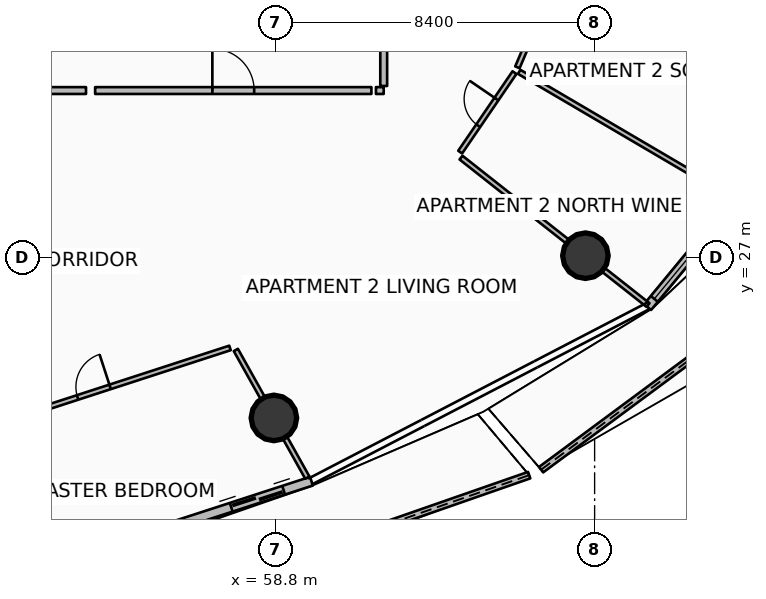
"""IFC4 building model, lengths in metres.
Left out: names, types, materials, properties, quantities, classifications, styles, units other than length and angle.
Written with IfcOpenShell. Run it as: python <this file> out.ifc"""

import sys

from ifc_helpers import new_model, si_unit, direction, frame, frame_2d, origin, origin_2d, place, context, subcontext, project, spatial, polyline, rectangle, circle, outline, extrude, element, fill, save


model = new_model("IFC4")
c1 = context("Model", 3, precision=1e-05, world=origin(), true_north=direction((0.0, 1.0)))
c2 = subcontext(c1, "Body", "Model", "MODEL_VIEW")
j1 = project(units=[si_unit("LENGTHUNIT", "METRE"), si_unit("PLANEANGLEUNIT", "RADIAN")], contexts=[c1])
p1 = place(None, origin())
s1 = spatial("IfcSite", under=j1, at=p1, CompositionType="ELEMENT")
p2 = place(p1, origin())
s2 = spatial("IfcBuilding", under=s1, at=p2, CompositionType="ELEMENT")
p3 = place(p2, frame((0.0, 0.0, 90.15)))
s3 = spatial("IfcBuildingStorey", under=s2, at=p3, CompositionType="ELEMENT", Elevation=90.15)
for number, where, z_axis, x_axis in (
    (1, (58.76, 22.786, 0.0), (0.0, 0.0, 1.0), (1.0, 0.0, 0.0)),
    (2, (66.958, 27.055, 0.0), (0.0, 0.0, 1.0), (1.0, 0.0, 0.0)),
):
    element("IfcColumn", number, at=place(p3, frame(where, z_axis=z_axis, x_axis=x_axis)), inside=s3, PredefinedType="COLUMN", context=c2, shape_type="SweptSolid", body=[
        extrude(circle(Radius=0.6, at=origin_2d()), origin(), (0.0, 0.0, 1.0), 3.5),
    ])
p4 = place(p3, frame((55.938, 17.957, 0.0), z_axis=(0.0, 0.0, 1.0), x_axis=(0.944336605893, 0.328980812161, 0.0)))
e3 = element("IfcWall", 3, at=p4, inside=s3, PredefinedType="PARAPET", context=c2, shape_type="SweptSolid", body=[
    extrude(outline(polyline([(0.0, 0.0), (10.102, 0.0), (10.102, 1.483), (5.051, 1.284), (0.0, 1.148), (0.0, 0.0)])), frame((0.0, 0.09, 0.0), z_axis=(0.0, -1.0, 0.0), x_axis=(1.0, 0.0, 0.0)), (0.0, 0.0, 1.0), 0.18),
])
p5 = place(p3, frame((65.792, 21.424, 0.0), z_axis=(0.0, 0.0, 1.0), x_axis=(0.803659411402, 0.59508953147, 0.0)))
e4 = element("IfcWall", 4, at=p5, inside=s3, PredefinedType="PARAPET", context=c2, shape_type="SweptSolid", body=[
    extrude(outline(polyline([(0.0, 0.0), (11.338, 0.0), (11.338, 1.832), (5.669, 1.696), (0.0, 1.497), (0.0, 0.0)])), frame((0.0, 0.09, 0.0), z_axis=(0.0, -1.0, 0.0), x_axis=(1.0, 0.0, 0.0)), (0.0, 0.0, 1.0), 0.18),
])
p6 = place(p3, frame((50.767, 18.203, 0.0), z_axis=(0.0, 0.0, 1.0), x_axis=(0.951052494852, 0.30902937083, 0.0)))
e5 = element("IfcWall", 5, at=p6, inside=s3, PredefinedType="SOLIDWALL", context=c2, shape_type="SweptSolid", body=[
    extrude(rectangle(XDim=9.444, YDim=0.24, at=frame_2d((4.722, 0.0))), origin(), (0.0, 0.0, 1.0), 2.45),
])
p7 = place(p6, frame((7.224, 0.0, 0.0)))
e6 = element("IfcOpeningElement", 6, at=p7, cuts=e5, PredefinedType="OPENING", context=c2, shape_type="SweptSolid", body=[
    extrude(rectangle(XDim=1.45, YDim=2.15, at=frame_2d((0.725, 1.075))), frame((0.0, 0.13, 0.0), z_axis=(0.0, -1.0, 0.0), x_axis=(1.0, 0.0, 0.0)), (0.0, 0.0, 1.0), 0.26),
])
p8 = place(p6, frame((0.28, 0.0, 0.65)))
e7 = element("IfcOpeningElement", 7, at=p8, cuts=e5, PredefinedType="OPENING", context=c2, shape_type="SweptSolid", body=[
    extrude(rectangle(XDim=1.6, YDim=1.5, at=frame_2d((0.8, 0.75))), frame((0.0, 0.13, 0.0), z_axis=(0.0, -1.0, 0.0), x_axis=(1.0, 0.0, 0.0)), (0.0, 0.0, 1.0), 0.26),
])
p9 = place(p3, frame((68.593, 25.702, 0.0), z_axis=(0.0, 0.0, 1.0), x_axis=(0.636704975, 0.771107498868, 0.0)))
e8 = element("IfcWall", 8, at=p9, inside=s3, PredefinedType="SOLIDWALL", context=c2, shape_type="SweptSolid", body=[
    extrude(rectangle(XDim=11.084, YDim=0.24, at=frame_2d((5.542, 0.0))), origin(), (0.0, 0.0, 1.0), 2.45),
])
p10 = place(p9, frame((8.864, 0.0, 0.0)))
e9 = element("IfcOpeningElement", 9, at=p10, cuts=e8, PredefinedType="OPENING", context=c2, shape_type="SweptSolid", body=[
    extrude(rectangle(XDim=1.45, YDim=2.15, at=frame_2d((0.725, 1.075))), frame((0.0, 0.13, 0.0), z_axis=(0.0, -1.0, 0.0), x_axis=(1.0, 0.0, 0.0)), (0.0, 0.0, 1.0), 0.26),
])
p11 = place(p9, frame((0.28, 0.0, 0.65)))
e10 = element("IfcOpeningElement", 10, at=p11, cuts=e8, PredefinedType="OPENING", context=c2, shape_type="SweptSolid", body=[
    extrude(rectangle(XDim=1.6, YDim=1.5, at=frame_2d((0.8, 0.75))), frame((0.0, 0.13, 0.0), z_axis=(0.0, -1.0, 0.0), x_axis=(1.0, 0.0, 0.0)), (0.0, 0.0, 1.0), 0.26),
])
p12 = place(p3, frame((54.056, 31.4, 0.0), z_axis=(0.0, 0.0, 1.0), x_axis=(1.0, 0.0, 0.0)))
e11 = element("IfcWall", 11, at=p12, inside=s3, PredefinedType="PARTITIONING", context=c2, shape_type="SweptSolid", body=[
    extrude(rectangle(XDim=7.27, YDim=0.18, at=frame_2d((3.635, 0.0))), origin(), (0.0, 0.0, 1.0), 2.94),
])
p13 = place(p12, frame((3.085, 0.0, 0.0)))
e12 = element("IfcOpeningElement", 12, at=p13, cuts=e11, PredefinedType="OPENING", context=c2, shape_type="SweptSolid", body=[
    extrude(rectangle(XDim=1.1, YDim=2.1, at=frame_2d((0.55, 1.05))), frame((0.0, 0.1, 0.0), z_axis=(0.0, -1.0, 0.0), x_axis=(1.0, 0.0, 0.0)), (0.0, 0.0, 1.0), 0.2),
])
p14 = place(p3, frame((49.375, 31.4, 0.0), z_axis=(0.0, 0.0, 1.0), x_axis=(1.0, 0.0, 0.0)))
e13 = element("IfcWall", 13, at=p14, inside=s3, PredefinedType="PARTITIONING", context=c2, shape_type="SweptSolid", body=[
    extrude(rectangle(XDim=4.442, YDim=0.18, at=frame_2d((2.221, 0.0))), origin(), (0.0, 0.0, 1.0), 2.94),
])
p15 = place(p3, frame((57.759, 24.575, 0.0), z_axis=(0.0, 0.0, 1.0), x_axis=(0.488595646066, -0.87251034071, 0.0)))
e14 = element("IfcWall", 14, at=p15, inside=s3, PredefinedType="PARTITIONING", context=c2, shape_type="SweptSolid", body=[
    extrude(rectangle(XDim=3.851, YDim=0.125, at=frame_2d((1.925, 0.0))), origin(), (0.0, 0.0, 1.0), 2.94),
])
p16 = place(p3, frame((50.44, 22.3, 0.0), z_axis=(0.0, 0.0, 1.0), x_axis=(0.951063594717, 0.308995208383, 0.0)))
e15 = element("IfcWall", 15, at=p16, inside=s3, PredefinedType="PARTITIONING", context=c2, shape_type="SweptSolid", body=[
    extrude(rectangle(XDim=7.534, YDim=0.125, at=frame_2d((3.767, 0.0))), origin(), (0.0, 0.0, 1.0), 2.94),
])
p17 = place(p16, frame((3.317, 0.0, 0.0)))
e16 = element("IfcOpeningElement", 16, at=p17, cuts=e15, PredefinedType="OPENING", context=c2, shape_type="SweptSolid", body=[
    extrude(rectangle(XDim=0.9, YDim=2.08, at=frame_2d((0.45, 1.04))), frame((0.0, 0.073, 0.0), z_axis=(0.0, -1.0, 0.0), x_axis=(1.0, 0.0, 0.0)), (0.0, 0.0, 1.0), 0.145),
])
p18 = place(p3, frame((61.446, 31.4, 0.0), z_axis=(0.0, 0.0, 1.0), x_axis=(1.0, 0.0, 0.0)))
e17 = element("IfcWall", 17, at=p18, inside=s3, PredefinedType="PARTITIONING", context=c2, shape_type="SweptSolid", body=[
    extrude(rectangle(XDim=0.204, YDim=0.18, at=frame_2d((0.102, 0.0))), origin(), (0.0, 0.0, 1.0), 2.94),
])
p19 = place(p3, frame((61.65, 31.52, 0.0), z_axis=(0.0, 0.0, 1.0), x_axis=(0.0, 1.0, 0.0)))
e18 = element("IfcWall", 18, at=p19, inside=s3, PredefinedType="PARTITIONING", context=c2, shape_type="SweptSolid", body=[
    extrude(rectangle(XDim=6.51, YDim=0.18, at=frame_2d((3.255, 0.0))), origin(), (0.0, 0.0, 1.0), 2.94),
])
p20 = place(p3, frame((63.684, 29.635, 0.0), z_axis=(0.0, 0.0, 1.0), x_axis=(0.785296487737, -0.619119880434, 0.0)))
e19 = element("IfcWall", 19, at=p20, inside=s3, PredefinedType="PARTITIONING", context=c2, shape_type="SweptSolid", body=[
    extrude(rectangle(XDim=6.266, YDim=0.125, at=frame_2d((3.133, 0.0))), origin(), (0.0, 0.0, 1.0), 2.94),
])
p21 = place(p3, frame((65.214, 31.893, 0.0), z_axis=(0.0, 0.0, 1.0), x_axis=(0.862328516234, -0.506349217527, 0.0)))
e20 = element("IfcWall", 20, at=p21, inside=s3, PredefinedType="PARTITIONING", context=c2, shape_type="SweptSolid", body=[
    extrude(rectangle(XDim=6.506, YDim=0.125, at=frame_2d((3.253, 0.0))), origin(), (0.0, 0.0, 1.0), 2.94),
])
p22 = place(p3, frame((63.662, 29.78, 0.0), z_axis=(0.0, 0.0, 1.0), x_axis=(0.56409306427, 0.825711217583, 0.0)))
e21 = element("IfcWall", 21, at=p22, inside=s3, PredefinedType="PARTITIONING", context=c2, shape_type="SweptSolid", body=[
    extrude(rectangle(XDim=2.534, YDim=0.125, at=frame_2d((1.267, 0.0))), origin(), (0.0, 0.0, 1.0), 2.94),
])
p23 = place(p22, frame((0.842, 0.0, 0.0)))
e22 = element("IfcOpeningElement", 22, at=p23, cuts=e21, PredefinedType="OPENING", context=c2, shape_type="SweptSolid", body=[
    extrude(rectangle(XDim=0.85, YDim=2.06, at=frame_2d((0.425, 1.03))), frame((0.0, 0.073, 0.0), z_axis=(0.0, -1.0, 0.0), x_axis=(1.0, 0.0, 0.0)), (0.0, 0.0, 1.0), 0.145),
])
p24 = place(p3, frame((65.168, 32.012, 0.0), z_axis=(0.0, 0.0, 1.0), x_axis=(0.392094288326, 0.91992503448, 0.0)))
e23 = element("IfcWall", 23, at=p24, inside=s3, PredefinedType="PARTITIONING", context=c2, shape_type="SweptSolid", body=[
    extrude(rectangle(XDim=4.894, YDim=0.125, at=frame_2d((2.447, 0.0))), origin(), (0.0, 0.0, 1.0), 2.94),
])
p25 = place(p24, frame((1.997, 0.0, 0.0)))
e24 = element("IfcOpeningElement", 24, at=p25, cuts=e23, PredefinedType="OPENING", context=c2, shape_type="SweptSolid", body=[
    extrude(rectangle(XDim=0.9, YDim=2.08, at=frame_2d((0.45, 1.04))), frame((0.0, 0.073, 0.0), z_axis=(0.0, -1.0, 0.0), x_axis=(1.0, 0.0, 0.0)), (0.0, 0.0, 1.0), 0.145),
])
p26 = place(p7, origin())
e25 = element("IfcDoor", 25, at=p26, inside=s3, OperationType="DOUBLE_DOOR_SLIDING", PredefinedType="DOOR", context=c2, shape_type="SweptSolid", body=[
    extrude(rectangle(XDim=1.45, YDim=2.15, at=frame_2d((0.725, 1.075))), frame((0.0, 0.025, 0.0), z_axis=(0.0, -1.0, 0.0), x_axis=(1.0, 0.0, 0.0)), (0.0, 0.0, 1.0), 0.05),
])
fill(e6, e25)
p27 = place(p11, origin())
e26 = element("IfcWindow", 26, at=p27, inside=s3, PartitioningType="SINGLE_PANEL", PredefinedType="WINDOW", context=c2, shape_type="SweptSolid", body=[
    extrude(rectangle(XDim=1.6, YDim=1.5, at=frame_2d((0.8, 0.75))), frame((0.0, 0.03, 0.0), z_axis=(0.0, -1.0, 0.0), x_axis=(1.0, 0.0, 0.0)), (0.0, 0.0, 1.0), 0.06),
])
fill(e10, e26)
p28 = place(p13, origin())
e27 = element("IfcDoor", 27, at=p28, inside=s3, OperationType="SINGLE_SWING_LEFT", PredefinedType="DOOR", context=c2, shape_type="SweptSolid", body=[
    extrude(rectangle(XDim=1.1, YDim=2.1, at=frame_2d((0.55, 1.05))), frame((0.0, 0.025, 0.0), z_axis=(0.0, -1.0, 0.0), x_axis=(1.0, 0.0, 0.0)), (0.0, 0.0, 1.0), 0.05),
])
fill(e12, e27)
p29 = place(p17, origin())
e28 = element("IfcDoor", 28, at=p29, inside=s3, OperationType="SINGLE_SWING_RIGHT", PredefinedType="DOOR", context=c2, shape_type="SweptSolid", body=[
    extrude(rectangle(XDim=0.9, YDim=2.08, at=frame_2d((0.45, 1.04))), frame((0.0, 0.025, 0.0), z_axis=(0.0, -1.0, 0.0), x_axis=(1.0, 0.0, 0.0)), (0.0, 0.0, 1.0), 0.05),
])
fill(e16, e28)
p30 = place(p23, origin())
e29 = element("IfcDoor", 29, at=p30, inside=s3, OperationType="SINGLE_SWING_RIGHT", PredefinedType="DOOR", context=c2, shape_type="SweptSolid", body=[
    extrude(rectangle(XDim=0.85, YDim=2.06, at=frame_2d((0.425, 1.03))), frame((0.0, 0.025, 0.0), z_axis=(0.0, -1.0, 0.0), x_axis=(1.0, 0.0, 0.0)), (0.0, 0.0, 1.0), 0.05),
])
fill(e22, e29)
save(model, sys.argv[1])
